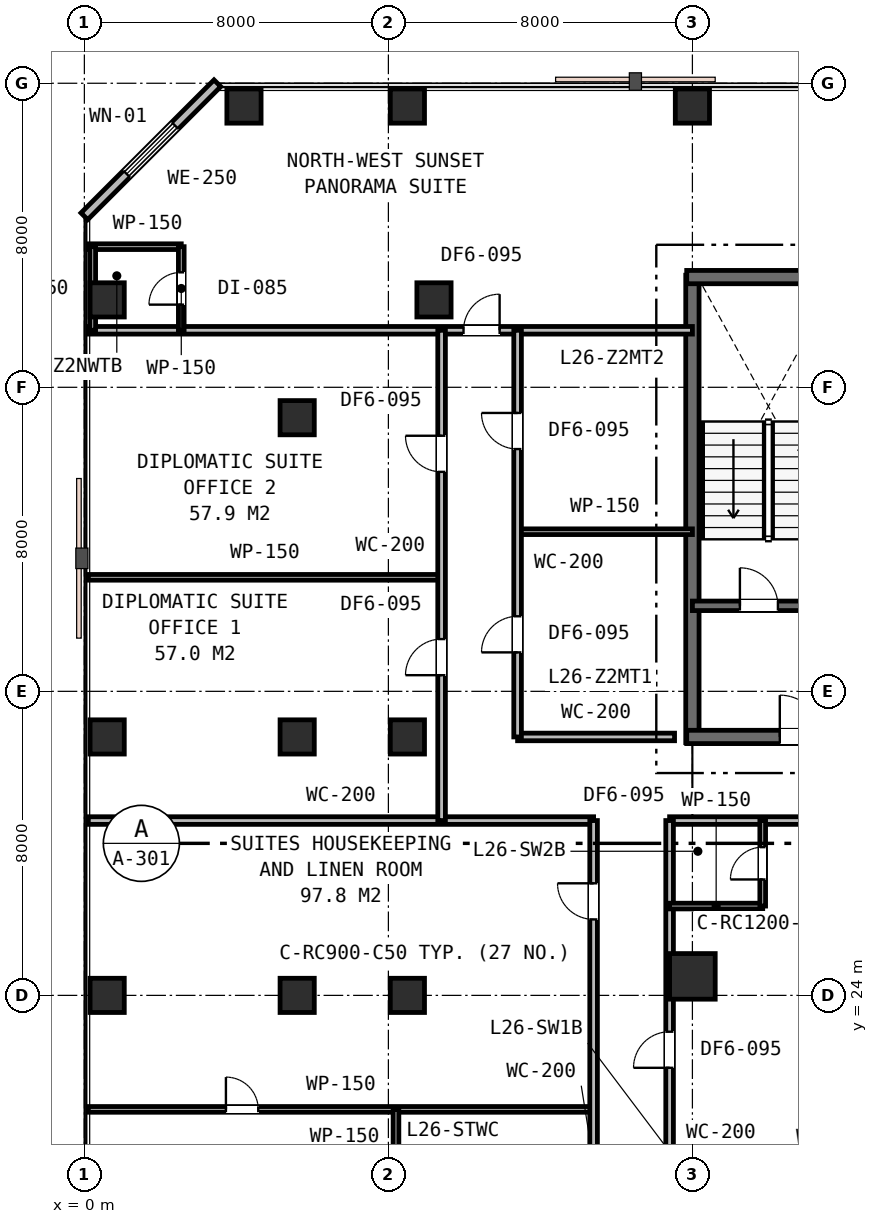
"""IFC4 building model, lengths in metres.
Left out: names, types, materials, properties, quantities, classifications, styles, units other than length and angle.
Written with IfcOpenShell. Run it as: python <this file> out.ifc"""

import sys

from ifc_helpers import new_model, si_unit, direction, frame, frame_2d, origin, origin_2d, place, context, subcontext, project, spatial, rectangle, extrude, element, fill, save


model = new_model("IFC4")
c1 = context("Model", 3, precision=1e-05, world=origin(), true_north=direction((0.0, 1.0)))
c2 = subcontext(c1, "Body", "Model", "MODEL_VIEW")
j1 = project(units=[si_unit("LENGTHUNIT", "METRE"), si_unit("PLANEANGLEUNIT", "RADIAN")], contexts=[c1])
p1 = place(None, origin())
s1 = spatial("IfcSite", under=j1, at=p1, CompositionType="ELEMENT")
p2 = place(p1, origin())
s2 = spatial("IfcBuilding", under=s1, at=p2, CompositionType="ELEMENT")
p3 = place(p2, frame((0.0, 0.0, 104.4)))
s3 = spatial("IfcBuildingStorey", under=s2, at=p3, CompositionType="ELEMENT", Elevation=104.4)
p4 = place(p3, frame((16.0, 30.65, 0.0), z_axis=(0.0, 0.0, 1.0), x_axis=(0.0, 1.0, 0.0)))
e1 = element("IfcWall", 1, at=p4, inside=s3, PredefinedType="SHEAR", context=c2, shape_type="SweptSolid", body=[
    extrude(rectangle(XDim=12.3, YDim=0.35, at=frame_2d((6.15, 0.0))), origin(), (0.0, 0.0, 1.0), 3.6),
])
p5 = place(p3, frame((15.85, 42.9, 0.0), z_axis=(0.0, 0.0, 1.0), x_axis=(1.0, 0.0, 0.0)))
e2 = element("IfcWall", 2, at=p5, inside=s3, PredefinedType="SHEAR", context=c2, shape_type="SweptSolid", body=[
    extrude(rectangle(XDim=24.3, YDim=0.35, at=frame_2d((12.15, 0.0))), origin(), (0.0, 0.0, 1.0), 3.6),
])
p6 = place(p3, frame((15.85, 30.8, 0.0), z_axis=(0.0, 0.0, 1.0), x_axis=(1.0, 0.0, 0.0)))
e3 = element("IfcWall", 3, at=p6, inside=s3, PredefinedType="SHEAR", context=c2, shape_type="SweptSolid", body=[
    extrude(rectangle(XDim=11.2, YDim=0.35, at=frame_2d((5.6, 0.0))), origin(), (0.0, 0.0, 1.0), 3.6),
])
p7 = place(p6, frame((2.45, 0.0, 0.0)))
e4 = element("IfcOpeningElement", 4, at=p7, cuts=e3, PredefinedType="OPENING", context=c2, shape_type="SweptSolid", body=[
    extrude(rectangle(XDim=1.1, YDim=2.15, at=frame_2d((0.55, 1.075))), frame((0.0, 0.185, 0.0), z_axis=(0.0, -1.0, 0.0), x_axis=(1.0, 0.0, 0.0)), (0.0, 0.0, 1.0), 0.37),
])
p8 = place(p3, frame((16.0, 34.25, 0.0), z_axis=(0.0, 0.0, 1.0), x_axis=(1.0, 0.0, 0.0)))
e5 = element("IfcWall", 5, at=p8, inside=s3, PredefinedType="SHEAR", context=c2, shape_type="SweptSolid", body=[
    extrude(rectangle(XDim=6.05, YDim=0.25, at=frame_2d((3.025, 0.0))), origin(), (0.0, 0.0, 1.0), 3.6),
])
p9 = place(p8, frame((1.25, 0.0, 0.0)))
e6 = element("IfcOpeningElement", 6, at=p9, cuts=e5, PredefinedType="OPENING", context=c2, shape_type="SweptSolid", body=[
    extrude(rectangle(XDim=1.0, YDim=2.15, at=frame_2d((0.5, 1.075))), frame((0.0, 0.135, 0.0), z_axis=(0.0, -1.0, 0.0), x_axis=(1.0, 0.0, 0.0)), (0.0, 0.0, 1.0), 0.27),
])
p10 = place(p8, frame((4.2, 0.0, 0.0)))
e7 = element("IfcOpeningElement", 7, at=p10, cuts=e5, PredefinedType="OPENING", context=c2, shape_type="SweptSolid", body=[
    extrude(rectangle(XDim=1.1, YDim=2.15, at=frame_2d((0.55, 1.075))), frame((0.0, 0.135, 0.0), z_axis=(0.0, -1.0, 0.0), x_axis=(1.0, 0.0, 0.0)), (0.0, 0.0, 1.0), 0.27),
])
p11 = place(p3, frame((8.5, 24.0, 0.0), z_axis=(0.0, 0.0, 1.0), x_axis=(1.0, 0.0, 0.0)))
e8 = element("IfcColumn", 8, at=p11, inside=s3, PredefinedType="COLUMN", context=c2, shape_type="SweptSolid", body=[
    extrude(rectangle(XDim=0.9, YDim=0.9, at=origin_2d()), origin(), (0.0, 0.0, 1.0), 3.6),
])
p12 = place(p3, frame((16.0, 24.5, 0.0), z_axis=(0.0, 0.0, 1.0), x_axis=(1.0, 0.0, 0.0)))
e9 = element("IfcColumn", 9, at=p12, inside=s3, PredefinedType="COLUMN", context=c2, shape_type="SweptSolid", body=[
    extrude(rectangle(XDim=1.2, YDim=1.2, at=origin_2d()), origin(), (0.0, 0.0, 1.0), 3.6),
])
for number, where, z_axis, x_axis in (
    (10, (5.6, 24.0, 0.0), (0.0, 0.0, 1.0), (1.0, 0.0, 0.0)),
    (11, (5.6, 30.8, 0.0), (0.0, 0.0, 1.0), (1.0, 0.0, 0.0)),
    (12, (5.6, 39.2, 0.0), (0.0, 0.0, 1.0), (1.0, 0.0, 0.0)),
    (13, (8.5, 30.8, 0.0), (0.0, 0.0, 1.0), (1.0, 0.0, 0.0)),
    (14, (9.2, 42.3, 0.0), (0.0, 0.0, 1.0), (1.0, 0.0, 0.0)),
    (15, (0.6, 24.0, 0.0), (0.0, 0.0, 1.0), (1.0, 0.0, 0.0)),
    (16, (0.6, 30.8, 0.0), (0.0, 0.0, 1.0), (1.0, 0.0, 0.0)),
    (17, (0.6, 42.3, 0.0), (0.0, 0.0, 1.0), (1.0, 0.0, 0.0)),
    (18, (4.2, 47.4, 0.0), (0.0, 0.0, 1.0), (1.0, 0.0, 0.0)),
    (19, (8.5, 47.4, 0.0), (0.0, 0.0, 1.0), (1.0, 0.0, 0.0)),
    (20, (16.0, 47.4, 0.0), (0.0, 0.0, 1.0), (1.0, 0.0, 0.0)),
):
    element("IfcColumn", number, at=place(p3, frame(where, z_axis=z_axis, x_axis=x_axis)), inside=s3, PredefinedType="COLUMN", context=c2, shape_type="SweptSolid", body=[
        extrude(rectangle(XDim=0.9, YDim=0.9, at=origin_2d()), origin(), (0.0, 0.0, 1.0), 3.6),
    ])
p13 = place(p3, frame((3.5, 48.0, 0.0), z_axis=(0.0, 0.0, 1.0), x_axis=(-0.707106781187, -0.707106781187, 0.0)))
e21 = element("IfcWall", 21, at=p13, inside=s3, PredefinedType="STANDARD", context=c2, shape_type="SweptSolid", body=[
    extrude(rectangle(XDim=4.95, YDim=0.25, at=frame_2d((2.475, 0.0))), origin(), (0.0, 0.0, 1.0), 3.33),
])
p14 = place(p13, frame((1.575, 0.0, 0.75)))
e22 = element("IfcOpeningElement", 22, at=p14, cuts=e21, PredefinedType="OPENING", context=c2, shape_type="SweptSolid", body=[
    extrude(rectangle(XDim=1.8, YDim=1.85, at=frame_2d((0.9, 0.925))), frame((0.0, 0.135, 0.0), z_axis=(0.0, -1.0, 0.0), x_axis=(1.0, 0.0, 0.0)), (0.0, 0.0, 1.0), 0.27),
])
p15 = place(p3, frame((0.1, 28.6, 0.0), z_axis=(0.0, 0.0, 1.0), x_axis=(1.0, 0.0, 0.0)))
e23 = element("IfcWall", 23, at=p15, inside=s3, PredefinedType="PARTITIONING", context=c2, shape_type="SweptSolid", body=[
    extrude(rectangle(XDim=13.3, YDim=0.2, at=frame_2d((6.65, 0.0))), origin(), (0.0, 0.0, 1.0), 2.87),
])
p16 = place(p3, frame((15.4, 28.6, 0.0), z_axis=(0.0, 0.0, 1.0), x_axis=(1.0, 0.0, 0.0)))
e24 = element("IfcWall", 24, at=p16, inside=s3, PredefinedType="PARTITIONING", context=c2, shape_type="SweptSolid", body=[
    extrude(rectangle(XDim=28.8, YDim=0.2, at=frame_2d((14.4, 0.0))), origin(), (0.0, 0.0, 1.0), 2.87),
])
p17 = place(p16, frame((12.41, 0.0, 0.0)))
e25 = element("IfcOpeningElement", 25, at=p17, cuts=e24, PredefinedType="OPENING", context=c2, shape_type="SweptSolid", body=[
    extrude(rectangle(XDim=0.95, YDim=2.15, at=frame_2d((0.475, 1.075))), frame((0.0, 0.11, 0.0), z_axis=(0.0, -1.0, 0.0), x_axis=(1.0, 0.0, 0.0)), (0.0, 0.0, 1.0), 0.22),
])
p18 = place(p16, frame((22.68, 0.0, 0.0)))
e26 = element("IfcOpeningElement", 26, at=p18, cuts=e24, PredefinedType="OPENING", context=c2, shape_type="SweptSolid", body=[
    extrude(rectangle(XDim=0.95, YDim=2.15, at=frame_2d((0.475, 1.075))), frame((0.0, 0.11, 0.0), z_axis=(0.0, -1.0, 0.0), x_axis=(1.0, 0.0, 0.0)), (0.0, 0.0, 1.0), 0.22),
])
p19 = place(p3, frame((11.4, 30.8, 0.0), z_axis=(0.0, 0.0, 1.0), x_axis=(1.0, 0.0, 0.0)))
e27 = element("IfcWall", 27, at=p19, inside=s3, PredefinedType="PARTITIONING", context=c2, shape_type="SweptSolid", body=[
    extrude(rectangle(XDim=4.13, YDim=0.2, at=frame_2d((2.065, 0.0))), origin(), (0.0, 0.0, 1.0), 2.87),
])
p20 = place(p3, frame((0.1, 21.0, 0.0), z_axis=(0.0, 0.0, 1.0), x_axis=(1.0, 0.0, 0.0)))
e28 = element("IfcWall", 28, at=p20, inside=s3, PredefinedType="PARTITIONING", context=c2, shape_type="SweptSolid", body=[
    extrude(rectangle(XDim=13.3, YDim=0.15, at=frame_2d((6.65, 0.0))), origin(), (0.0, 0.0, 1.0), 2.87),
])
p21 = place(p20, frame((3.625, 0.0, 0.0)))
e29 = element("IfcOpeningElement", 29, at=p21, cuts=e28, PredefinedType="OPENING", context=c2, shape_type="SweptSolid", body=[
    extrude(rectangle(XDim=0.85, YDim=2.15, at=frame_2d((0.425, 1.075))), frame((0.0, 0.085, 0.0), z_axis=(0.0, -1.0, 0.0), x_axis=(1.0, 0.0, 0.0)), (0.0, 0.0, 1.0), 0.17),
])
p22 = place(p3, frame((8.2, 18.0, 0.0), z_axis=(0.0, 0.0, 1.0), x_axis=(0.0, 1.0, 0.0)))
e30 = element("IfcWall", 30, at=p22, inside=s3, PredefinedType="PARTITIONING", context=c2, shape_type="SweptSolid", body=[
    extrude(rectangle(XDim=3.0, YDim=0.15, at=frame_2d((1.5, 0.0))), origin(), (0.0, 0.0, 1.0), 2.87),
])
p23 = place(p3, frame((13.4, 10.6, 0.0), z_axis=(0.0, 0.0, 1.0), x_axis=(0.0, 1.0, 0.0)))
e31 = element("IfcWall", 31, at=p23, inside=s3, PredefinedType="PARTITIONING", context=c2, shape_type="SweptSolid", body=[
    extrude(rectangle(XDim=18.0, YDim=0.2, at=frame_2d((9.0, 0.0))), origin(), (0.0, 0.0, 1.0), 2.87),
])
p24 = place(p23, frame((8.425, 0.0, 0.0)))
e32 = element("IfcOpeningElement", 32, at=p24, cuts=e31, PredefinedType="OPENING", context=c2, shape_type="SweptSolid", body=[
    extrude(rectangle(XDim=0.95, YDim=2.15, at=frame_2d((0.475, 1.075))), frame((0.0, 0.11, 0.0), z_axis=(0.0, -1.0, 0.0), x_axis=(1.0, 0.0, 0.0)), (0.0, 0.0, 1.0), 0.22),
])
p25 = place(p23, frame((15.399, 0.0, 0.0)))
e33 = element("IfcOpeningElement", 33, at=p25, cuts=e31, PredefinedType="OPENING", context=c2, shape_type="SweptSolid", body=[
    extrude(rectangle(XDim=0.95, YDim=2.15, at=frame_2d((0.475, 1.075))), frame((0.0, 0.11, 0.0), z_axis=(0.0, -1.0, 0.0), x_axis=(1.0, 0.0, 0.0)), (0.0, 0.0, 1.0), 0.22),
])
p26 = place(p23, frame((3.225, 0.0, 0.0)))
e34 = element("IfcOpeningElement", 34, at=p26, cuts=e31, PredefinedType="OPENING", context=c2, shape_type="SweptSolid", body=[
    extrude(rectangle(XDim=0.95, YDim=2.15, at=frame_2d((0.475, 1.075))), frame((0.0, 0.11, 0.0), z_axis=(0.0, -1.0, 0.0), x_axis=(1.0, 0.0, 0.0)), (0.0, 0.0, 1.0), 0.22),
])
p27 = place(p3, frame((0.1, 41.5, 0.0), z_axis=(0.0, 0.0, 1.0), x_axis=(1.0, 0.0, 0.0)))
e35 = element("IfcWall", 35, at=p27, inside=s3, PredefinedType="PARTITIONING", context=c2, shape_type="SweptSolid", body=[
    extrude(rectangle(XDim=15.9, YDim=0.2, at=frame_2d((7.95, 0.0))), origin(), (0.0, 0.0, 1.0), 2.87),
])
p28 = place(p27, frame((9.877, 0.0, 0.0)))
e36 = element("IfcOpeningElement", 36, at=p28, cuts=e35, PredefinedType="OPENING", context=c2, shape_type="SweptSolid", body=[
    extrude(rectangle(XDim=0.95, YDim=2.15, at=frame_2d((0.475, 1.075))), frame((0.0, 0.11, 0.0), z_axis=(0.0, -1.0, 0.0), x_axis=(1.0, 0.0, 0.0)), (0.0, 0.0, 1.0), 0.22),
])
p29 = place(p3, frame((0.1, 43.7, 0.0), z_axis=(0.0, 0.0, 1.0), x_axis=(1.0, 0.0, 0.0)))
e37 = element("IfcWall", 37, at=p29, inside=s3, PredefinedType="PARTITIONING", context=c2, shape_type="SweptSolid", body=[
    extrude(rectangle(XDim=2.45, YDim=0.15, at=frame_2d((1.225, 0.0))), origin(), (0.0, 0.0, 1.0), 3.33),
])
p30 = place(p3, frame((2.55, 41.5, 0.0), z_axis=(0.0, 0.0, 1.0), x_axis=(0.0, 1.0, 0.0)))
e38 = element("IfcWall", 38, at=p30, inside=s3, PredefinedType="PARTITIONING", context=c2, shape_type="SweptSolid", body=[
    extrude(rectangle(XDim=2.2, YDim=0.15, at=frame_2d((1.1, 0.0))), origin(), (0.0, 0.0, 1.0), 2.87),
])
p31 = place(p30, frame((0.675, 0.0, 0.0)))
e39 = element("IfcOpeningElement", 39, at=p31, cuts=e38, PredefinedType="OPENING", context=c2, shape_type="SweptSolid", body=[
    extrude(rectangle(XDim=0.85, YDim=2.15, at=frame_2d((0.425, 1.075))), frame((0.0, 0.085, 0.0), z_axis=(0.0, -1.0, 0.0), x_axis=(1.0, 0.0, 0.0)), (0.0, 0.0, 1.0), 0.17),
])
p32 = place(p3, frame((0.22, 41.5, 0.0), z_axis=(0.0, 0.0, 1.0), x_axis=(0.0, 1.0, 0.0)))
e40 = element("IfcWall", 40, at=p32, inside=s3, PredefinedType="PARTITIONING", context=c2, shape_type="SweptSolid", body=[
    extrude(rectangle(XDim=2.2, YDim=0.15, at=frame_2d((1.1, 0.0))), origin(), (0.0, 0.0, 1.0), 2.87),
])
p33 = place(p3, frame((0.1, 35.0, 0.0), z_axis=(0.0, 0.0, 1.0), x_axis=(1.0, 0.0, 0.0)))
e41 = element("IfcWall", 41, at=p33, inside=s3, PredefinedType="PARTITIONING", context=c2, shape_type="SweptSolid", body=[
    extrude(rectangle(XDim=9.3, YDim=0.15, at=frame_2d((4.65, 0.0))), origin(), (0.0, 0.0, 1.0), 2.87),
])
p34 = place(p3, frame((11.4, 36.2, 0.0), z_axis=(0.0, 0.0, 1.0), x_axis=(1.0, 0.0, 0.0)))
e42 = element("IfcWall", 42, at=p34, inside=s3, PredefinedType="PARTITIONING", context=c2, shape_type="SweptSolid", body=[
    extrude(rectangle(XDim=4.6, YDim=0.15, at=frame_2d((2.3, 0.0))), origin(), (0.0, 0.0, 1.0), 3.33),
])
p35 = place(p3, frame((9.4, 28.6, 0.0), z_axis=(0.0, 0.0, 1.0), x_axis=(0.0, 1.0, 0.0)))
e43 = element("IfcWall", 43, at=p35, inside=s3, PredefinedType="PARTITIONING", context=c2, shape_type="SweptSolid", body=[
    extrude(rectangle(XDim=12.9, YDim=0.2, at=frame_2d((6.45, 0.0))), origin(), (0.0, 0.0, 1.0), 2.87),
])
p36 = place(p35, frame((3.825, 0.0, 0.0)))
e44 = element("IfcOpeningElement", 44, at=p36, cuts=e43, PredefinedType="OPENING", context=c2, shape_type="SweptSolid", body=[
    extrude(rectangle(XDim=0.95, YDim=2.15, at=frame_2d((0.475, 1.075))), frame((0.0, 0.11, 0.0), z_axis=(0.0, -1.0, 0.0), x_axis=(1.0, 0.0, 0.0)), (0.0, 0.0, 1.0), 0.22),
])
p37 = place(p35, frame((9.175, 0.0, 0.0)))
e45 = element("IfcOpeningElement", 45, at=p37, cuts=e43, PredefinedType="OPENING", context=c2, shape_type="SweptSolid", body=[
    extrude(rectangle(XDim=0.95, YDim=2.15, at=frame_2d((0.475, 1.075))), frame((0.0, 0.11, 0.0), z_axis=(0.0, -1.0, 0.0), x_axis=(1.0, 0.0, 0.0)), (0.0, 0.0, 1.0), 0.22),
])
p38 = place(p3, frame((11.4, 30.8, 0.0), z_axis=(0.0, 0.0, 1.0), x_axis=(0.0, 1.0, 0.0)))
e46 = element("IfcWall", 46, at=p38, inside=s3, PredefinedType="PARTITIONING", context=c2, shape_type="SweptSolid", body=[
    extrude(rectangle(XDim=10.7, YDim=0.2, at=frame_2d((5.35, 0.0))), origin(), (0.0, 0.0, 1.0), 2.87),
])
p39 = place(p38, frame((2.225, 0.0, 0.0)))
e47 = element("IfcOpeningElement", 47, at=p39, cuts=e46, PredefinedType="OPENING", context=c2, shape_type="SweptSolid", body=[
    extrude(rectangle(XDim=0.95, YDim=2.15, at=frame_2d((0.475, 1.075))), frame((0.0, 0.11, 0.0), z_axis=(0.0, -1.0, 0.0), x_axis=(1.0, 0.0, 0.0)), (0.0, 0.0, 1.0), 0.22),
])
p40 = place(p38, frame((7.575, 0.0, 0.0)))
e48 = element("IfcOpeningElement", 48, at=p40, cuts=e46, PredefinedType="OPENING", context=c2, shape_type="SweptSolid", body=[
    extrude(rectangle(XDim=0.95, YDim=2.15, at=frame_2d((0.475, 1.075))), frame((0.0, 0.11, 0.0), z_axis=(0.0, -1.0, 0.0), x_axis=(1.0, 0.0, 0.0)), (0.0, 0.0, 1.0), 0.22),
])
p41 = place(p3, frame((15.4, 10.6, 0.0), z_axis=(0.0, 0.0, 1.0), x_axis=(0.0, 1.0, 0.0)))
e49 = element("IfcWall", 49, at=p41, inside=s3, PredefinedType="PARTITIONING", context=c2, shape_type="SweptSolid", body=[
    extrude(rectangle(XDim=18.0, YDim=0.2, at=frame_2d((9.0, 0.0))), origin(), (0.0, 0.0, 1.0), 2.87),
])
p42 = place(p41, frame((4.24, 0.0, 0.0)))
e50 = element("IfcOpeningElement", 50, at=p42, cuts=e49, PredefinedType="OPENING", context=c2, shape_type="SweptSolid", body=[
    extrude(rectangle(XDim=0.95, YDim=2.15, at=frame_2d((0.475, 1.075))), frame((0.0, 0.11, 0.0), z_axis=(0.0, -1.0, 0.0), x_axis=(1.0, 0.0, 0.0)), (0.0, 0.0, 1.0), 0.22),
])
p43 = place(p41, frame((11.494, 0.0, 0.0)))
e51 = element("IfcOpeningElement", 51, at=p43, cuts=e49, PredefinedType="OPENING", context=c2, shape_type="SweptSolid", body=[
    extrude(rectangle(XDim=0.95, YDim=2.15, at=frame_2d((0.475, 1.075))), frame((0.0, 0.11, 0.0), z_axis=(0.0, -1.0, 0.0), x_axis=(1.0, 0.0, 0.0)), (0.0, 0.0, 1.0), 0.22),
])
p44 = place(p3, frame((15.4, 26.35, 0.0), z_axis=(0.0, 0.0, 1.0), x_axis=(1.0, 0.0, 0.0)))
e52 = element("IfcWall", 52, at=p44, inside=s3, PredefinedType="PARTITIONING", context=c2, shape_type="SweptSolid", body=[
    extrude(rectangle(XDim=2.45, YDim=0.15, at=frame_2d((1.225, 0.0))), origin(), (0.0, 0.0, 1.0), 2.87),
])
p45 = place(p3, frame((17.85, 26.35, 0.0), z_axis=(0.0, 0.0, 1.0), x_axis=(0.0, 1.0, 0.0)))
e53 = element("IfcWall", 53, at=p45, inside=s3, PredefinedType="PARTITIONING", context=c2, shape_type="SweptSolid", body=[
    extrude(rectangle(XDim=2.25, YDim=0.15, at=frame_2d((1.125, 0.0))), origin(), (0.0, 0.0, 1.0), 3.33),
])
p46 = place(p45, frame((0.7, 0.0, 0.0)))
e54 = element("IfcOpeningElement", 54, at=p46, cuts=e53, PredefinedType="OPENING", context=c2, shape_type="SweptSolid", body=[
    extrude(rectangle(XDim=0.85, YDim=2.15, at=frame_2d((0.425, 1.075))), frame((0.0, 0.085, 0.0), z_axis=(0.0, -1.0, 0.0), x_axis=(1.0, 0.0, 0.0)), (0.0, 0.0, 1.0), 0.17),
])
p47 = place(p14, origin())
e55 = element("IfcWindow", 55, at=p47, inside=s3, PartitioningType="SINGLE_PANEL", PredefinedType="WINDOW", context=c2, shape_type="SweptSolid", body=[
    extrude(rectangle(XDim=1.8, YDim=1.85, at=frame_2d((0.9, 0.925))), frame((0.0, 0.03, 0.0), z_axis=(0.0, -1.0, 0.0), x_axis=(1.0, 0.0, 0.0)), (0.0, 0.0, 1.0), 0.06),
])
fill(e22, e55)
p48 = place(p9, origin())
e56 = element("IfcDoor", 56, at=p48, inside=s3, OperationType="SINGLE_SWING_LEFT", PredefinedType="DOOR", context=c2, shape_type="SweptSolid", body=[
    extrude(rectangle(XDim=1.0, YDim=2.15, at=frame_2d((0.5, 1.075))), frame((0.0, 0.025, 0.0), z_axis=(0.0, -1.0, 0.0), x_axis=(1.0, 0.0, 0.0)), (0.0, 0.0, 1.0), 0.05),
])
fill(e6, e56)
p49 = place(p7, origin())
e57 = element("IfcDoor", 57, at=p49, inside=s3, OperationType="SINGLE_SWING_LEFT", PredefinedType="DOOR", context=c2, shape_type="SweptSolid", body=[
    extrude(rectangle(XDim=1.1, YDim=2.15, at=frame_2d((0.55, 1.075))), frame((0.0, 0.025, 0.0), z_axis=(0.0, -1.0, 0.0), x_axis=(1.0, 0.0, 0.0)), (0.0, 0.0, 1.0), 0.05),
])
fill(e4, e57)
p50 = place(p21, origin())
e58 = element("IfcDoor", 58, at=p50, inside=s3, OperationType="SINGLE_SWING_LEFT", PredefinedType="DOOR", context=c2, shape_type="SweptSolid", body=[
    extrude(rectangle(XDim=0.85, YDim=2.15, at=frame_2d((0.425, 1.075))), frame((0.0, 0.025, 0.0), z_axis=(0.0, -1.0, 0.0), x_axis=(1.0, 0.0, 0.0)), (0.0, 0.0, 1.0), 0.05),
])
fill(e29, e58)
p51 = place(p25, origin())
e59 = element("IfcDoor", 59, at=p51, inside=s3, OperationType="SINGLE_SWING_RIGHT", PredefinedType="DOOR", context=c2, shape_type="SweptSolid", body=[
    extrude(rectangle(XDim=0.95, YDim=2.15, at=frame_2d((0.475, 1.075))), frame((0.0, 0.025, 0.0), z_axis=(0.0, -1.0, 0.0), x_axis=(1.0, 0.0, 0.0)), (0.0, 0.0, 1.0), 0.05),
])
fill(e33, e59)
p52 = place(p28, origin())
e60 = element("IfcDoor", 60, at=p52, inside=s3, OperationType="SINGLE_SWING_RIGHT", PredefinedType="DOOR", context=c2, shape_type="SweptSolid", body=[
    extrude(rectangle(XDim=0.95, YDim=2.15, at=frame_2d((0.475, 1.075))), frame((0.0, 0.025, 0.0), z_axis=(0.0, -1.0, 0.0), x_axis=(1.0, 0.0, 0.0)), (0.0, 0.0, 1.0), 0.05),
])
fill(e36, e60)
p53 = place(p31, origin())
e61 = element("IfcDoor", 61, at=p53, inside=s3, OperationType="SINGLE_SWING_LEFT", PredefinedType="DOOR", context=c2, shape_type="SweptSolid", body=[
    extrude(rectangle(XDim=0.85, YDim=2.15, at=frame_2d((0.425, 1.075))), frame((0.0, 0.025, 0.0), z_axis=(0.0, -1.0, 0.0), x_axis=(1.0, 0.0, 0.0)), (0.0, 0.0, 1.0), 0.05),
])
fill(e39, e61)
p54 = place(p36, origin())
e62 = element("IfcDoor", 62, at=p54, inside=s3, OperationType="SINGLE_SWING_LEFT", PredefinedType="DOOR", context=c2, shape_type="SweptSolid", body=[
    extrude(rectangle(XDim=0.95, YDim=2.15, at=frame_2d((0.475, 1.075))), frame((0.0, 0.025, 0.0), z_axis=(0.0, -1.0, 0.0), x_axis=(1.0, 0.0, 0.0)), (0.0, 0.0, 1.0), 0.05),
])
fill(e44, e62)
p55 = place(p37, origin())
e63 = element("IfcDoor", 63, at=p55, inside=s3, OperationType="SINGLE_SWING_RIGHT", PredefinedType="DOOR", context=c2, shape_type="SweptSolid", body=[
    extrude(rectangle(XDim=0.95, YDim=2.15, at=frame_2d((0.475, 1.075))), frame((0.0, 0.025, 0.0), z_axis=(0.0, -1.0, 0.0), x_axis=(1.0, 0.0, 0.0)), (0.0, 0.0, 1.0), 0.05),
])
fill(e45, e63)
p56 = place(p39, origin())
e64 = element("IfcDoor", 64, at=p56, inside=s3, OperationType="SINGLE_SWING_LEFT", PredefinedType="DOOR", context=c2, shape_type="SweptSolid", body=[
    extrude(rectangle(XDim=0.95, YDim=2.15, at=frame_2d((0.475, 1.075))), frame((0.0, 0.025, 0.0), z_axis=(0.0, -1.0, 0.0), x_axis=(1.0, 0.0, 0.0)), (0.0, 0.0, 1.0), 0.05),
])
fill(e47, e64)
p57 = place(p40, origin())
e65 = element("IfcDoor", 65, at=p57, inside=s3, OperationType="SINGLE_SWING_RIGHT", PredefinedType="DOOR", context=c2, shape_type="SweptSolid", body=[
    extrude(rectangle(XDim=0.95, YDim=2.15, at=frame_2d((0.475, 1.075))), frame((0.0, 0.025, 0.0), z_axis=(0.0, -1.0, 0.0), x_axis=(1.0, 0.0, 0.0)), (0.0, 0.0, 1.0), 0.05),
])
fill(e48, e65)
p58 = place(p43, origin())
e66 = element("IfcDoor", 66, at=p58, inside=s3, OperationType="SINGLE_SWING_LEFT", PredefinedType="DOOR", context=c2, shape_type="SweptSolid", body=[
    extrude(rectangle(XDim=0.95, YDim=2.15, at=frame_2d((0.475, 1.075))), frame((0.0, 0.025, 0.0), z_axis=(0.0, -1.0, 0.0), x_axis=(1.0, 0.0, 0.0)), (0.0, 0.0, 1.0), 0.05),
])
fill(e51, e66)
p59 = place(p46, origin())
e67 = element("IfcDoor", 67, at=p59, inside=s3, OperationType="SINGLE_SWING_LEFT", PredefinedType="DOOR", context=c2, shape_type="SweptSolid", body=[
    extrude(rectangle(XDim=0.85, YDim=2.15, at=frame_2d((0.425, 1.075))), frame((0.0, 0.025, 0.0), z_axis=(0.0, -1.0, 0.0), x_axis=(1.0, 0.0, 0.0)), (0.0, 0.0, 1.0), 0.05),
])
fill(e54, e67)
save(model, sys.argv[1])
